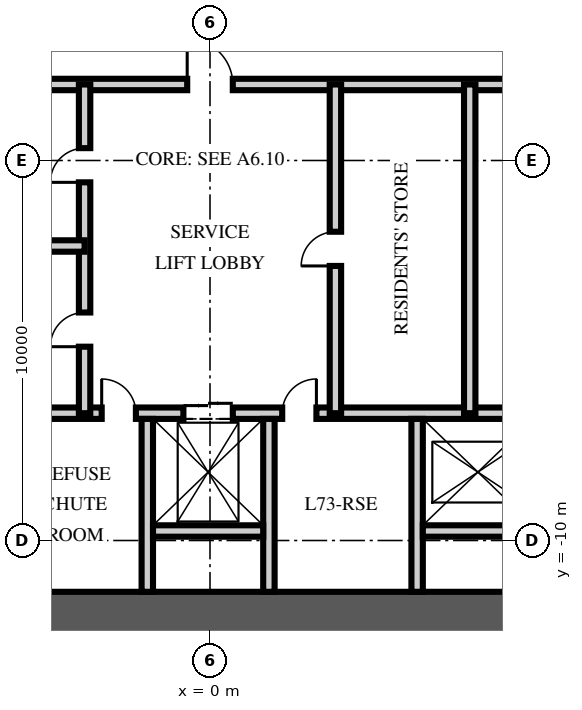
"""IFC4 building model, lengths in metres.
Left out: names, types, materials, properties, quantities, classifications, styles, units other than length and angle.
Written with IfcOpenShell. Run it as: python <this file> out.ifc"""

import sys

from ifc_helpers import new_model, si_unit, direction, frame, frame_2d, origin, place, context, subcontext, project, spatial, rectangle, extrude, element, fill, save


model = new_model("IFC4")
c1 = context("Model", 3, precision=1e-05, world=origin(), true_north=direction((0.0, 1.0)))
c2 = subcontext(c1, "Body", "Model", "MODEL_VIEW")
j1 = project(units=[si_unit("LENGTHUNIT", "METRE"), si_unit("PLANEANGLEUNIT", "RADIAN")], contexts=[c1])
p1 = place(None, origin())
s1 = spatial("IfcSite", under=j1, at=p1, CompositionType="ELEMENT")
p2 = place(p1, origin())
s2 = spatial("IfcBuilding", under=s1, at=p2, CompositionType="ELEMENT")
p3 = place(p2, frame((0.0, 0.0, 293.25)))
s3 = spatial("IfcBuildingStorey", under=s2, at=p3, CompositionType="ELEMENT", Elevation=293.25)
p4 = place(p3, frame((-15.5, -12.0, -0.25), z_axis=(0.0, 0.0, 1.0), x_axis=(1.0, 0.0, 0.0)))
e1 = element("IfcWall", 1, at=p4, inside=s3, PredefinedType="SHEAR", context=c2, shape_type="SweptSolid", body=[
    extrude(rectangle(XDim=31.0, YDim=1.3, at=frame_2d((15.5, 0.0))), origin(), (0.0, 0.0, 1.0), 3.75),
])
p5 = place(p3, frame((-8.5, -6.65, 0.0), z_axis=(0.0, 0.0, 1.0), x_axis=(1.0, 0.0, 0.0)))
e2 = element("IfcWall", 2, at=p5, inside=s3, PredefinedType="PARTITIONING", context=c2, shape_type="SweptSolid", body=[
    extrude(rectangle(XDim=17.0, YDim=0.3, at=frame_2d((8.5, 0.0))), origin(), (0.0, 0.0, 1.0), 3.5),
])
p6 = place(p5, frame((7.8, 0.0, 0.0)))
e3 = element("IfcOpeningElement", 3, at=p6, cuts=e2, PredefinedType="OPENING", context=c2, shape_type="SweptSolid", body=[
    extrude(rectangle(XDim=1.3, YDim=2.4, at=frame_2d((0.65, 1.2))), frame((0.0, 0.16, 0.0), z_axis=(0.0, -1.0, 0.0), x_axis=(1.0, 0.0, 0.0)), (0.0, 0.0, 1.0), 0.32),
])
p7 = place(p5, frame((5.65, 0.0, 0.0)))
e4 = element("IfcOpeningElement", 4, at=p7, cuts=e2, PredefinedType="OPENING", context=c2, shape_type="SweptSolid", body=[
    extrude(rectangle(XDim=0.9, YDim=2.1, at=frame_2d((0.45, 1.05))), frame((0.0, 0.16, 0.0), z_axis=(0.0, -1.0, 0.0), x_axis=(1.0, 0.0, 0.0)), (0.0, 0.0, 1.0), 0.32),
])
p8 = place(p5, frame((10.4, 0.0, 0.0)))
e5 = element("IfcOpeningElement", 5, at=p8, cuts=e2, PredefinedType="OPENING", context=c2, shape_type="SweptSolid", body=[
    extrude(rectangle(XDim=0.9, YDim=2.1, at=frame_2d((0.45, 1.05))), frame((0.0, 0.16, 0.0), z_axis=(0.0, -1.0, 0.0), x_axis=(1.0, 0.0, 0.0)), (0.0, 0.0, 1.0), 0.32),
])
for number, where, z_axis, x_axis in (
    (6, (-1.65, -11.35, 0.0), (0.0, 0.0, 1.0), (0.0, 1.0, 0.0)),
    (7, (1.55, -11.35, 0.0), (0.0, 0.0, 1.0), (0.0, 1.0, 0.0)),
    (8, (5.45, -11.35, 0.0), (0.0, 0.0, 1.0), (0.0, 1.0, 0.0)),
):
    element("IfcWall", number, at=place(p3, frame(where, z_axis=z_axis, x_axis=x_axis)), inside=s3, PredefinedType="PARTITIONING", context=c2, shape_type="SweptSolid", body=[
        extrude(rectangle(XDim=4.55, YDim=0.3, at=frame_2d((2.275, 0.0))), origin(), (0.0, 0.0, 1.0), 3.5),
    ])
for number, where, z_axis, x_axis in (
    (9, (-1.5, -9.75, 0.0), (0.0, 0.0, 1.0), (1.0, 0.0, 0.0)),
    (10, (5.6, -9.75, 0.0), (0.0, 0.0, 1.0), (1.0, 0.0, 0.0)),
):
    element("IfcWall", number, at=place(p3, frame(where, z_axis=z_axis, x_axis=x_axis)), inside=s3, PredefinedType="PARTITIONING", context=c2, shape_type="SweptSolid", body=[
        extrude(rectangle(XDim=2.9, YDim=0.3, at=frame_2d((1.45, 0.0))), origin(), (0.0, 0.0, 1.0), 3.5),
    ])
p9 = place(p3, frame((-10.65, 2.0, 0.0), z_axis=(0.0, 0.0, 1.0), x_axis=(1.0, 0.0, 0.0)))
e11 = element("IfcWall", 11, at=p9, inside=s3, PredefinedType="PARTITIONING", context=c2, shape_type="SweptSolid", body=[
    extrude(rectangle(XDim=21.3, YDim=0.3, at=frame_2d((10.65, 0.0))), origin(), (0.0, 0.0, 1.0), 3.5),
])
p10 = place(p9, frame((10.05, 0.0, 0.0)))
e12 = element("IfcOpeningElement", 12, at=p10, cuts=e11, PredefinedType="OPENING", context=c2, shape_type="SweptSolid", body=[
    extrude(rectangle(XDim=1.2, YDim=2.1, at=frame_2d((0.6, 1.05))), frame((0.0, 0.16, 0.0), z_axis=(0.0, -1.0, 0.0), x_axis=(1.0, 0.0, 0.0)), (0.0, 0.0, 1.0), 0.32),
])
p11 = place(p9, frame((18.942, 0.0, 0.0)))
e13 = element("IfcOpeningElement", 13, at=p11, cuts=e11, PredefinedType="OPENING", context=c2, shape_type="SweptSolid", body=[
    extrude(rectangle(XDim=0.9, YDim=2.1, at=frame_2d((0.45, 1.05))), frame((0.0, 0.16, 0.0), z_axis=(0.0, -1.0, 0.0), x_axis=(1.0, 0.0, 0.0)), (0.0, 0.0, 1.0), 0.32),
])
p12 = place(p3, frame((-3.3, -6.65, 0.0), z_axis=(0.0, 0.0, 1.0), x_axis=(0.0, 1.0, 0.0)))
e14 = element("IfcWall", 14, at=p12, inside=s3, PredefinedType="PARTITIONING", context=c2, shape_type="SweptSolid", body=[
    extrude(rectangle(XDim=8.65, YDim=0.3, at=frame_2d((4.325, 0.0))), origin(), (0.0, 0.0, 1.0), 3.5),
])
p13 = place(p12, frame((1.75, 0.0, 0.0)))
e15 = element("IfcOpeningElement", 15, at=p13, cuts=e14, PredefinedType="OPENING", context=c2, shape_type="SweptSolid", body=[
    extrude(rectangle(XDim=0.9, YDim=2.1, at=frame_2d((0.45, 1.05))), frame((0.0, 0.16, 0.0), z_axis=(0.0, -1.0, 0.0), x_axis=(1.0, 0.0, 0.0)), (0.0, 0.0, 1.0), 0.32),
])
p14 = place(p12, frame((6.075, 0.0, 0.0)))
e16 = element("IfcOpeningElement", 16, at=p14, cuts=e14, PredefinedType="OPENING", context=c2, shape_type="SweptSolid", body=[
    extrude(rectangle(XDim=0.9, YDim=2.1, at=frame_2d((0.45, 1.05))), frame((0.0, 0.16, 0.0), z_axis=(0.0, -1.0, 0.0), x_axis=(1.0, 0.0, 0.0)), (0.0, 0.0, 1.0), 0.32),
])
p15 = place(p3, frame((3.3, -6.65, 0.0), z_axis=(0.0, 0.0, 1.0), x_axis=(0.0, 1.0, 0.0)))
e17 = element("IfcWall", 17, at=p15, inside=s3, PredefinedType="PARTITIONING", context=c2, shape_type="SweptSolid", body=[
    extrude(rectangle(XDim=8.65, YDim=0.3, at=frame_2d((4.325, 0.0))), origin(), (0.0, 0.0, 1.0), 3.5),
])
p16 = place(p15, frame((3.875, 0.0, 0.0)))
e18 = element("IfcOpeningElement", 18, at=p16, cuts=e17, PredefinedType="OPENING", context=c2, shape_type="SweptSolid", body=[
    extrude(rectangle(XDim=0.9, YDim=2.1, at=frame_2d((0.45, 1.05))), frame((0.0, 0.16, 0.0), z_axis=(0.0, -1.0, 0.0), x_axis=(1.0, 0.0, 0.0)), (0.0, 0.0, 1.0), 0.32),
])
p17 = place(p3, frame((-10.65, -2.25, 0.0), z_axis=(0.0, 0.0, 1.0), x_axis=(1.0, 0.0, 0.0)))
e19 = element("IfcWall", 19, at=p17, inside=s3, PredefinedType="PARTITIONING", context=c2, shape_type="SweptSolid", body=[
    extrude(rectangle(XDim=7.35, YDim=0.3, at=frame_2d((3.675, 0.0))), origin(), (0.0, 0.0, 1.0), 3.5),
])
p18 = place(p3, frame((6.834, -6.65, 0.0), z_axis=(0.0, 0.0, 1.0), x_axis=(0.0, 1.0, 0.0)))
e20 = element("IfcWall", 20, at=p18, inside=s3, PredefinedType="PARTITIONING", context=c2, shape_type="SweptSolid", body=[
    extrude(rectangle(XDim=8.65, YDim=0.3, at=frame_2d((4.325, 0.0))), origin(), (0.0, 0.0, 1.0), 3.5),
])
p19 = place(p6, origin())
e21 = element("IfcDoor", 21, at=p19, inside=s3, OperationType="DOUBLE_DOOR_SLIDING", PredefinedType="DOOR", context=c2, shape_type="SweptSolid", body=[
    extrude(rectangle(XDim=1.3, YDim=2.4, at=frame_2d((0.65, 1.2))), frame((0.0, 0.025, 0.0), z_axis=(0.0, -1.0, 0.0), x_axis=(1.0, 0.0, 0.0)), (0.0, 0.0, 1.0), 0.05),
])
fill(e3, e21)
p20 = place(p10, origin())
e22 = element("IfcDoor", 22, at=p20, inside=s3, OperationType="SINGLE_SWING_LEFT", PredefinedType="DOOR", context=c2, shape_type="SweptSolid", body=[
    extrude(rectangle(XDim=1.2, YDim=2.1, at=frame_2d((0.6, 1.05))), frame((0.0, 0.025, 0.0), z_axis=(0.0, -1.0, 0.0), x_axis=(1.0, 0.0, 0.0)), (0.0, 0.0, 1.0), 0.05),
])
fill(e12, e22)
p21 = place(p7, origin())
e23 = element("IfcDoor", 23, at=p21, inside=s3, OperationType="SINGLE_SWING_LEFT", PredefinedType="DOOR", context=c2, shape_type="SweptSolid", body=[
    extrude(rectangle(XDim=0.9, YDim=2.1, at=frame_2d((0.45, 1.05))), frame((0.0, 0.025, 0.0), z_axis=(0.0, -1.0, 0.0), x_axis=(1.0, 0.0, 0.0)), (0.0, 0.0, 1.0), 0.05),
])
fill(e4, e23)
p22 = place(p8, origin())
e24 = element("IfcDoor", 24, at=p22, inside=s3, OperationType="SINGLE_SWING_RIGHT", PredefinedType="DOOR", context=c2, shape_type="SweptSolid", body=[
    extrude(rectangle(XDim=0.9, YDim=2.1, at=frame_2d((0.45, 1.05))), frame((0.0, 0.025, 0.0), z_axis=(0.0, -1.0, 0.0), x_axis=(1.0, 0.0, 0.0)), (0.0, 0.0, 1.0), 0.05),
])
fill(e5, e24)
p23 = place(p13, origin())
e25 = element("IfcDoor", 25, at=p23, inside=s3, OperationType="SINGLE_SWING_LEFT", PredefinedType="DOOR", context=c2, shape_type="SweptSolid", body=[
    extrude(rectangle(XDim=0.9, YDim=2.1, at=frame_2d((0.45, 1.05))), frame((0.0, 0.025, 0.0), z_axis=(0.0, -1.0, 0.0), x_axis=(1.0, 0.0, 0.0)), (0.0, 0.0, 1.0), 0.05),
])
fill(e15, e25)
p24 = place(p14, origin())
e26 = element("IfcDoor", 26, at=p24, inside=s3, OperationType="SINGLE_SWING_LEFT", PredefinedType="DOOR", context=c2, shape_type="SweptSolid", body=[
    extrude(rectangle(XDim=0.9, YDim=2.1, at=frame_2d((0.45, 1.05))), frame((0.0, 0.025, 0.0), z_axis=(0.0, -1.0, 0.0), x_axis=(1.0, 0.0, 0.0)), (0.0, 0.0, 1.0), 0.05),
])
fill(e16, e26)
p25 = place(p16, origin())
e27 = element("IfcDoor", 27, at=p25, inside=s3, OperationType="SINGLE_SWING_LEFT", PredefinedType="DOOR", context=c2, shape_type="SweptSolid", body=[
    extrude(rectangle(XDim=0.9, YDim=2.1, at=frame_2d((0.45, 1.05))), frame((0.0, 0.025, 0.0), z_axis=(0.0, -1.0, 0.0), x_axis=(1.0, 0.0, 0.0)), (0.0, 0.0, 1.0), 0.05),
])
fill(e18, e27)
save(model, sys.argv[1])
